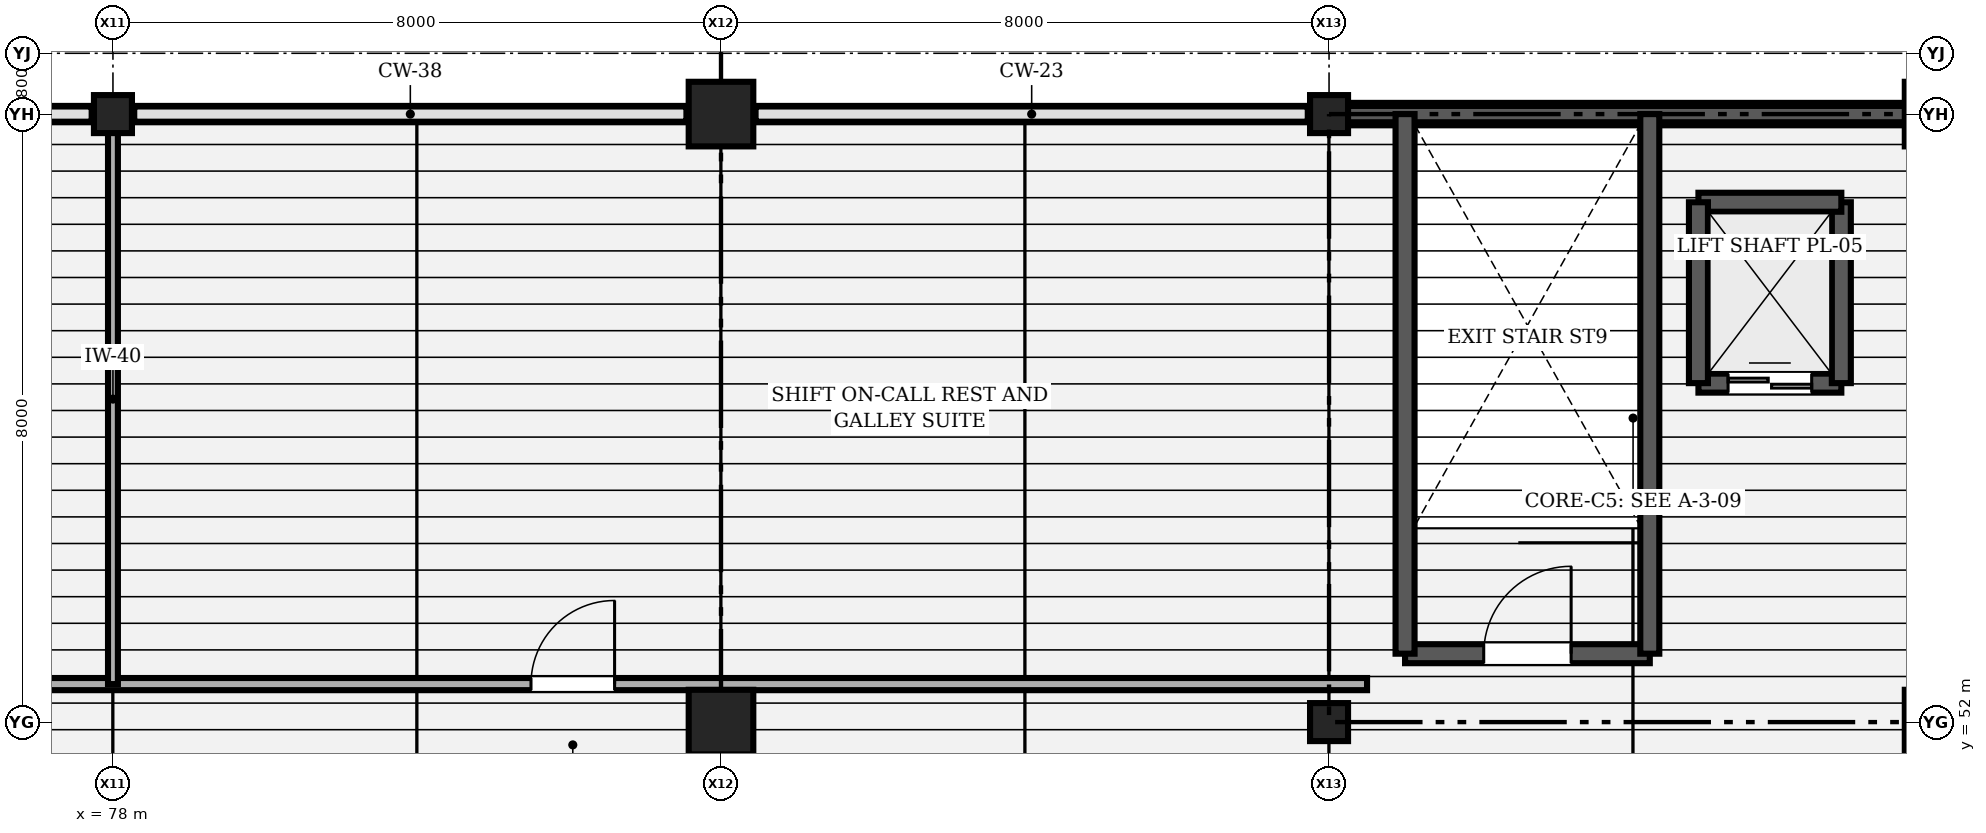
"""IFC4 building model, lengths in metres.
Left out: names, types, materials, properties, quantities, classifications, styles, units other than length and angle.
Written with IfcOpenShell. Run it as: python <this file> out.ifc"""

import sys

from ifc_helpers import new_model, si_unit, direction, frame, frame_2d, origin, origin_2d, place, context, subcontext, project, spatial, polyline, rectangle, outline, extrude, element, fill, save


model = new_model("IFC4")
c1 = context("Model", 3, precision=1e-05, world=origin(), true_north=direction((0.0, 1.0)))
c2 = subcontext(c1, "Body", "Model", "MODEL_VIEW")
j1 = project(units=[si_unit("LENGTHUNIT", "METRE"), si_unit("PLANEANGLEUNIT", "RADIAN")], contexts=[c1])
p1 = place(None, origin())
s1 = spatial("IfcSite", under=j1, at=p1, CompositionType="ELEMENT")
p2 = place(p1, origin())
s2 = spatial("IfcBuilding", under=s1, at=p2, CompositionType="ELEMENT")
p3 = place(p2, frame((0.0, 0.0, 13.5)))
s3 = spatial("IfcBuildingStorey", under=s2, at=p3, CompositionType="ELEMENT", Elevation=13.5)
p4 = place(p3, frame((78.0, 60.0, 0.0), z_axis=(0.0, 0.0, 1.0), x_axis=(1.0, 0.0, 0.0)))
e1 = element("IfcColumn", 1, at=p4, inside=s3, PredefinedType="COLUMN", context=c2, shape_type="SweptSolid", body=[
    extrude(rectangle(XDim=0.5, YDim=0.5, at=origin_2d()), origin(), (0.0, 0.0, 1.0), 4.5),
])
for number, where, z_axis, x_axis in (
    (2, (86.0, 52.0, 0.0), (0.0, 0.0, 1.0), (1.0, 0.0, 0.0)),
    (3, (86.0, 60.0, 0.0), (0.0, 0.0, 1.0), (1.0, 0.0, 0.0)),
):
    element("IfcColumn", number, at=place(p3, frame(where, z_axis=z_axis, x_axis=x_axis)), inside=s3, PredefinedType="COLUMN", context=c2, shape_type="SweptSolid", body=[
        extrude(rectangle(XDim=0.85, YDim=0.85, at=origin_2d()), origin(), (0.0, 0.0, 1.0), 4.5),
    ])
for number, where, z_axis, x_axis in (
    (4, (94.0, 52.0, 0.0), (0.0, 0.0, 1.0), (1.0, 0.0, 0.0)),
    (5, (94.0, 60.0, 0.0), (0.0, 0.0, 1.0), (1.0, 0.0, 0.0)),
):
    element("IfcColumn", number, at=place(p3, frame(where, z_axis=z_axis, x_axis=x_axis)), inside=s3, PredefinedType="COLUMN", context=c2, shape_type="SweptSolid", body=[
        extrude(rectangle(XDim=0.5, YDim=0.5, at=origin_2d()), origin(), (0.0, 0.0, 1.0), 4.5),
    ])
for number, where, z_axis, x_axis in (
    (6, (102.0, 52.0, 0.0), (0.0, 0.0, 1.0), (1.0, 0.0, 0.0)),
    (7, (102.0, 60.0, 0.0), (0.0, 0.0, 1.0), (1.0, 0.0, 0.0)),
):
    element("IfcColumn", number, at=place(p3, frame(where, z_axis=z_axis, x_axis=x_axis)), inside=s3, PredefinedType="COLUMN", context=c2, shape_type="SweptSolid", body=[
        extrude(rectangle(XDim=0.85, YDim=0.85, at=origin_2d()), origin(), (0.0, 0.0, 1.0), 4.5),
    ])
p5 = place(p3, frame((101.575, 60.0, 0.0), z_axis=(0.0, 0.0, 1.0), x_axis=(-1.0, 0.0, 0.0)))
e8 = element("IfcWall", 8, at=p5, inside=s3, PredefinedType="SOLIDWALL", context=c2, shape_type="SweptSolid", body=[
    extrude(rectangle(XDim=7.325, YDim=0.295, at=frame_2d((3.663, 0.0))), origin(), (0.0, 0.0, 1.0), 4.19),
])
for number, where, z_axis, x_axis in (
    (9, (70.0, 60.0, 4.5), (0.0, 0.0, 1.0), (1.0, 0.0, 0.0)),
    (10, (78.0, 60.0, 4.5), (0.0, 0.0, 1.0), (1.0, 0.0, 0.0)),
    (11, (86.0, 60.0, 4.5), (0.0, 0.0, 1.0), (1.0, 0.0, 0.0)),
    (12, (94.0, 60.0, 4.5), (0.0, 0.0, 1.0), (1.0, 0.0, 0.0)),
):
    element("IfcWall", number, at=place(p3, frame(where, z_axis=z_axis, x_axis=x_axis)), inside=s3, PredefinedType="SOLIDWALL", context=c2, shape_type="SweptSolid", body=[
        extrude(outline(polyline([(0.0, 0.0), (8.0, 0.0), (8.0, 0.05), (4.0, 7.75), (0.0, 0.05), (0.0, 0.0)])), frame((0.0, 0.107, 0.0), z_axis=(0.0, -1.0, 0.0), x_axis=(1.0, 0.0, 0.0)), (0.0, 0.0, 1.0), 0.215),
    ])
p6 = place(p3, frame((95.0, 52.9, 0.0), z_axis=(0.0, 0.0, 1.0), x_axis=(1.0, 0.0, 0.0)))
e13 = element("IfcWall", 13, at=p6, inside=s3, PredefinedType="SHEAR", context=c2, shape_type="SweptSolid", body=[
    extrude(rectangle(XDim=3.22, YDim=0.25, at=frame_2d((1.61, 0.0))), origin(), (0.0, 0.0, 1.0), 4.5),
])
p7 = place(p6, frame((1.035, 0.0, 0.0)))
e14 = element("IfcOpeningElement", 14, at=p7, cuts=e13, PredefinedType="OPENING", context=c2, shape_type="SweptSolid", body=[
    extrude(rectangle(XDim=1.15, YDim=2.15, at=frame_2d((0.575, 1.075))), frame((0.0, 0.135, 0.0), z_axis=(0.0, -1.0, 0.0), x_axis=(1.0, 0.0, 0.0)), (0.0, 0.0, 1.0), 0.27),
])
for number, where, z_axis, x_axis in (
    (15, (98.22, 52.9, 0.0), (0.0, 0.0, 1.0), (0.0, 1.0, 0.0)),
    (16, (95.0, 60.0, 0.0), (0.0, 0.0, 1.0), (0.0, -1.0, 0.0)),
):
    element("IfcWall", number, at=place(p3, frame(where, z_axis=z_axis, x_axis=x_axis)), inside=s3, PredefinedType="SHEAR", context=c2, shape_type="SweptSolid", body=[
        extrude(rectangle(XDim=7.1, YDim=0.25, at=frame_2d((3.55, 0.0))), origin(), (0.0, 0.0, 1.0), 4.5),
    ])
p8 = place(p3, frame((98.86, 56.46, 0.0), z_axis=(0.0, 0.0, 1.0), x_axis=(1.0, 0.0, 0.0)))
e17 = element("IfcWall", 17, at=p8, inside=s3, PredefinedType="SHEAR", context=c2, shape_type="SweptSolid", body=[
    extrude(rectangle(XDim=1.88, YDim=0.25, at=frame_2d((0.94, 0.0))), origin(), (0.0, 0.0, 1.0), 6.12),
])
p9 = place(p8, frame((0.39, 0.0, 0.0)))
e18 = element("IfcOpeningElement", 18, at=p9, cuts=e17, PredefinedType="OPENING", context=c2, shape_type="SweptSolid", body=[
    extrude(rectangle(XDim=1.1, YDim=2.2, at=frame_2d((0.55, 1.1))), frame((0.0, 0.135, 0.0), z_axis=(0.0, -1.0, 0.0), x_axis=(1.0, 0.0, 0.0)), (0.0, 0.0, 1.0), 0.27),
])
p10 = place(p3, frame((100.74, 56.46, 0.0), z_axis=(0.0, 0.0, 1.0), x_axis=(0.0, 1.0, 0.0)))
e19 = element("IfcWall", 19, at=p10, inside=s3, PredefinedType="SHEAR", context=c2, shape_type="SweptSolid", body=[
    extrude(rectangle(XDim=2.38, YDim=0.25, at=frame_2d((1.19, 0.0))), origin(), (0.0, 0.0, 1.0), 6.12),
])
p11 = place(p3, frame((100.74, 58.84, 0.0), z_axis=(0.0, 0.0, 1.0), x_axis=(-1.0, 0.0, 0.0)))
e20 = element("IfcWall", 20, at=p11, inside=s3, PredefinedType="SHEAR", context=c2, shape_type="SweptSolid", body=[
    extrude(rectangle(XDim=1.88, YDim=0.25, at=frame_2d((0.94, 0.0))), origin(), (0.0, 0.0, 1.0), 6.12),
])
p12 = place(p3, frame((98.86, 58.84, 0.0), z_axis=(0.0, 0.0, 1.0), x_axis=(0.0, -1.0, 0.0)))
e21 = element("IfcWall", 21, at=p12, inside=s3, PredefinedType="SHEAR", context=c2, shape_type="SweptSolid", body=[
    extrude(rectangle(XDim=2.38, YDim=0.25, at=frame_2d((1.19, 0.0))), origin(), (0.0, 0.0, 1.0), 6.12),
])
p13 = place(p3, frame((53.5, 52.5, 0.0), z_axis=(0.0, 0.0, 1.0), x_axis=(1.0, 0.0, 0.0)))
e22 = element("IfcWall", 22, at=p13, inside=s3, PredefinedType="PARTITIONING", context=c2, shape_type="SweptSolid", body=[
    extrude(rectangle(XDim=41.0, YDim=0.16, at=frame_2d((20.5, 0.0))), origin(), (0.0, 0.0, 1.0), 2.785),
])
p14 = place(p13, frame((10.0, 0.0, 0.0)))
e23 = element("IfcOpeningElement", 23, at=p14, cuts=e22, PredefinedType="OPENING", context=c2, shape_type="SweptSolid", body=[
    extrude(rectangle(XDim=1.1, YDim=2.15, at=frame_2d((0.55, 1.075))), frame((0.0, 0.09, 0.0), z_axis=(0.0, -1.0, 0.0), x_axis=(1.0, 0.0, 0.0)), (0.0, 0.0, 1.0), 0.18),
])
p15 = place(p13, frame((30.0, 0.0, 0.0)))
e24 = element("IfcOpeningElement", 24, at=p15, cuts=e22, PredefinedType="OPENING", context=c2, shape_type="SweptSolid", body=[
    extrude(rectangle(XDim=1.1, YDim=2.1, at=frame_2d((0.55, 1.05))), frame((0.0, 0.09, 0.0), z_axis=(0.0, -1.0, 0.0), x_axis=(1.0, 0.0, 0.0)), (0.0, 0.0, 1.0), 0.18),
])
p16 = place(p3, frame((78.0, 52.5, 0.0), z_axis=(0.0, 0.0, 1.0), x_axis=(0.0, 1.0, 0.0)))
e25 = element("IfcWall", 25, at=p16, inside=s3, PredefinedType="PARTITIONING", context=c2, shape_type="SweptSolid", body=[
    extrude(rectangle(XDim=7.5, YDim=0.13, at=frame_2d((3.75, 0.0))), origin(), (0.0, 0.0, 1.0), 2.785),
])
p17 = place(p7, origin())
e26 = element("IfcDoor", 26, at=p17, inside=s3, OperationType="SINGLE_SWING_RIGHT", PredefinedType="DOOR", context=c2, shape_type="SweptSolid", body=[
    extrude(rectangle(XDim=1.15, YDim=2.15, at=frame_2d((0.575, 1.075))), frame((0.0, 0.025, 0.0), z_axis=(0.0, -1.0, 0.0), x_axis=(1.0, 0.0, 0.0)), (0.0, 0.0, 1.0), 0.05),
])
fill(e14, e26)
p18 = place(p9, origin())
e27 = element("IfcDoor", 27, at=p18, inside=s3, OperationType="DOUBLE_DOOR_SLIDING", PredefinedType="DOOR", context=c2, shape_type="SweptSolid", body=[
    extrude(rectangle(XDim=1.1, YDim=2.2, at=frame_2d((0.55, 1.1))), frame((0.0, 0.025, 0.0), z_axis=(0.0, -1.0, 0.0), x_axis=(1.0, 0.0, 0.0)), (0.0, 0.0, 1.0), 0.05),
])
fill(e18, e27)
p19 = place(p15, origin())
e28 = element("IfcDoor", 28, at=p19, inside=s3, OperationType="SINGLE_SWING_RIGHT", PredefinedType="DOOR", context=c2, shape_type="SweptSolid", body=[
    extrude(rectangle(XDim=1.1, YDim=2.1, at=frame_2d((0.55, 1.05))), frame((0.0, 0.025, 0.0), z_axis=(0.0, -1.0, 0.0), x_axis=(1.0, 0.0, 0.0)), (0.0, 0.0, 1.0), 0.05),
])
fill(e24, e28)
save(model, sys.argv[1])
